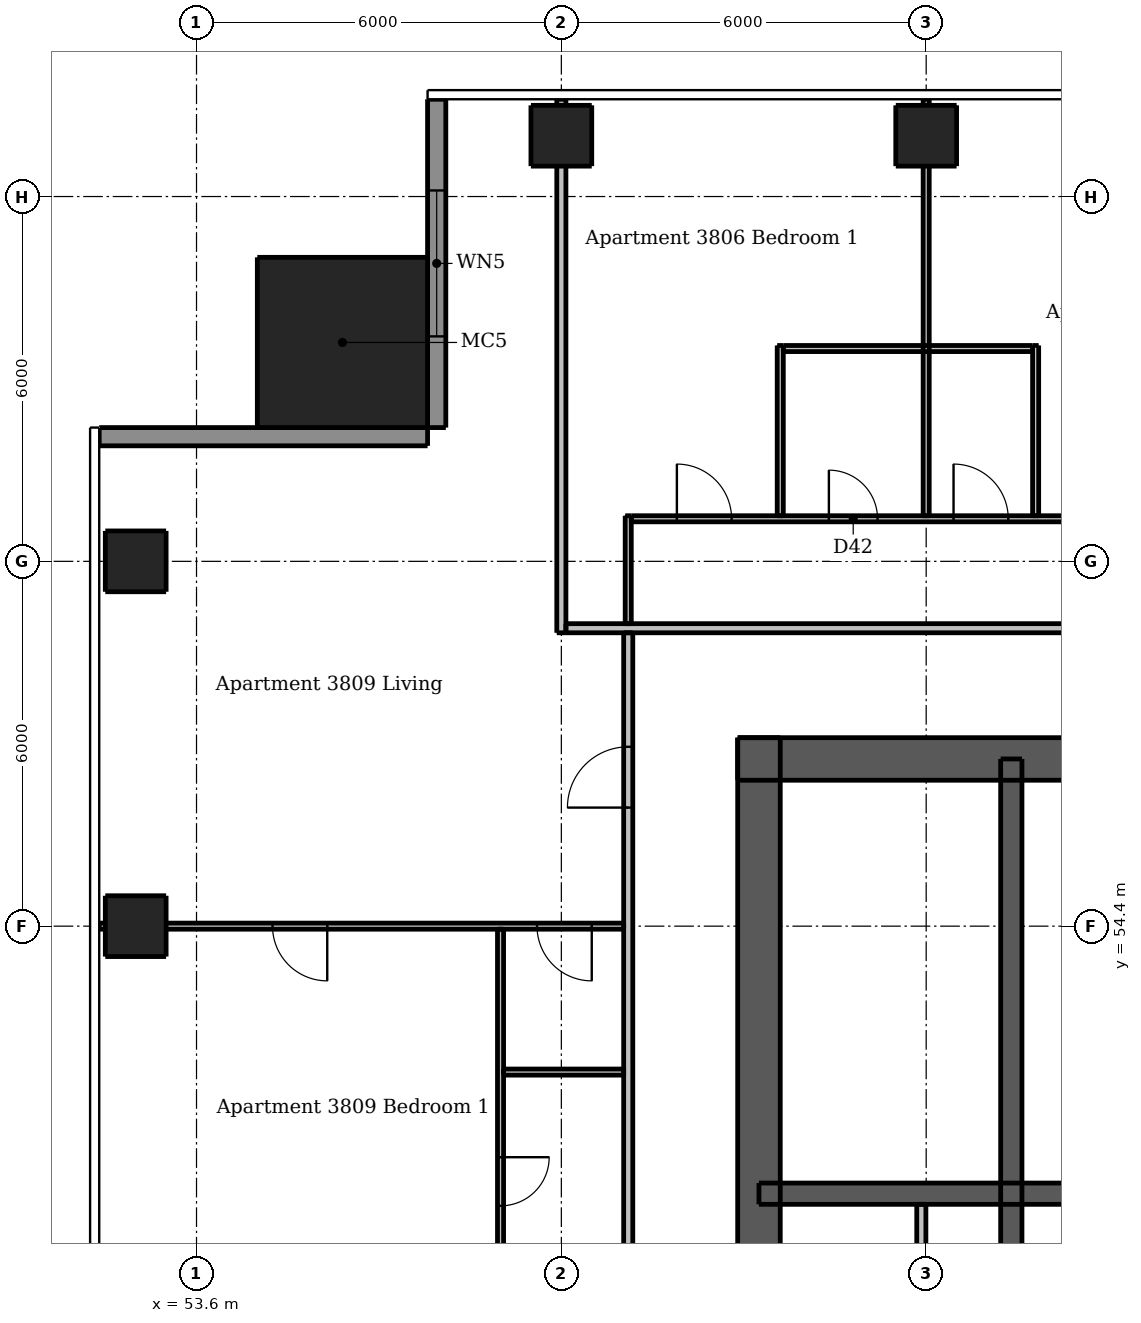
"""IFC4 building model, lengths in metres.
Left out: names, types, materials, properties, quantities, classifications, styles, units other than length and angle.
Written with IfcOpenShell. Run it as: python <this file> out.ifc"""

import sys

from ifc_helpers import new_model, si_unit, direction, frame, frame_2d, origin, origin_2d, place, context, subcontext, project, spatial, rectangle, extrude, element, fill, save


model = new_model("IFC4")
c1 = context("Model", 3, precision=1e-05, world=origin(), true_north=direction((0.0, 1.0)))
c2 = subcontext(c1, "Body", "Model", "MODEL_VIEW")
j1 = project(units=[si_unit("LENGTHUNIT", "METRE"), si_unit("PLANEANGLEUNIT", "RADIAN")], contexts=[c1])
p1 = place(None, origin())
s1 = spatial("IfcSite", under=j1, at=p1, CompositionType="ELEMENT")
p2 = place(p1, origin())
s2 = spatial("IfcBuilding", under=s1, at=p2, CompositionType="ELEMENT")
p3 = place(p2, frame((0.0, 0.0, 143.8)))
s3 = spatial("IfcBuildingStorey", under=s2, at=p3, CompositionType="ELEMENT", Elevation=143.8)
p4 = place(p3, frame((62.5, 57.15, 0.0), z_axis=(0.0, 0.0, 1.0), x_axis=(1.0, 0.0, 0.0)))
e1 = element("IfcWall", 1, at=p4, inside=s3, PredefinedType="SHEAR", context=c2, shape_type="SweptSolid", body=[
    extrude(rectangle(XDim=24.0, YDim=0.7, at=frame_2d((12.0, 0.0))), origin(), (0.0, 0.0, 1.0), 3.05),
])
p5 = place(p4, frame((20.938, 0.0, 0.0)))
e2 = element("IfcOpeningElement", 2, at=p5, cuts=e1, PredefinedType="OPENING", context=c2, shape_type="SweptSolid", body=[
    extrude(rectangle(XDim=1.1, YDim=2.1, at=frame_2d((0.55, 1.05))), frame((0.0, 0.36, 0.0), z_axis=(0.0, -1.0, 0.0), x_axis=(1.0, 0.0, 0.0)), (0.0, 0.0, 1.0), 0.72),
])
p6 = place(p4, frame((1.962, 0.0, 0.0)))
e3 = element("IfcOpeningElement", 3, at=p6, cuts=e1, PredefinedType="OPENING", context=c2, shape_type="SweptSolid", body=[
    extrude(rectangle(XDim=1.1, YDim=2.1, at=frame_2d((0.55, 1.05))), frame((0.0, 0.36, 0.0), z_axis=(0.0, -1.0, 0.0), x_axis=(1.0, 0.0, 0.0)), (0.0, 0.0, 1.0), 0.72),
])
p7 = place(p4, frame((7.887, 0.0, 0.0)))
e4 = element("IfcOpeningElement", 4, at=p7, cuts=e1, PredefinedType="OPENING", context=c2, shape_type="SweptSolid", body=[
    extrude(rectangle(XDim=0.9, YDim=2.1, at=frame_2d((0.45, 1.05))), frame((0.0, 0.36, 0.0), z_axis=(0.0, -1.0, 0.0), x_axis=(1.0, 0.0, 0.0)), (0.0, 0.0, 1.0), 0.72),
])
p8 = place(p4, frame((15.212, 0.0, 0.0)))
e5 = element("IfcOpeningElement", 5, at=p8, cuts=e1, PredefinedType="OPENING", context=c2, shape_type="SweptSolid", body=[
    extrude(rectangle(XDim=0.9, YDim=2.1, at=frame_2d((0.45, 1.05))), frame((0.0, 0.36, 0.0), z_axis=(0.0, -1.0, 0.0), x_axis=(1.0, 0.0, 0.0)), (0.0, 0.0, 1.0), 0.72),
])
p9 = place(p3, frame((62.85, 33.5, 0.0), z_axis=(0.0, 0.0, 1.0), x_axis=(0.0, 1.0, 0.0)))
e6 = element("IfcWall", 6, at=p9, inside=s3, PredefinedType="SHEAR", context=c2, shape_type="SweptSolid", body=[
    extrude(rectangle(XDim=24.0, YDim=0.7, at=frame_2d((12.0, 0.0))), origin(), (0.0, 0.0, 1.0), 3.05),
])
p10 = place(p9, frame((11.2, 0.0, 0.0)))
e7 = element("IfcOpeningElement", 7, at=p10, cuts=e6, PredefinedType="OPENING", context=c2, shape_type="SweptSolid", body=[
    extrude(rectangle(XDim=1.6, YDim=2.1, at=frame_2d((0.8, 1.05))), frame((0.0, 0.36, 0.0), z_axis=(0.0, -1.0, 0.0), x_axis=(1.0, 0.0, 0.0)), (0.0, 0.0, 1.0), 0.72),
])
p11 = place(p3, frame((62.85, 50.0, 0.0), z_axis=(0.0, 0.0, 1.0), x_axis=(1.0, 0.0, 0.0)))
e8 = element("IfcWall", 8, at=p11, inside=s3, PredefinedType="SHEAR", context=c2, shape_type="SweptSolid", body=[
    extrude(rectangle(XDim=23.3, YDim=0.35, at=frame_2d((11.65, 0.0))), origin(), (0.0, 0.0, 1.0), 3.05),
])
p12 = place(p3, frame((67.0, 47.1, 0.0), z_axis=(0.0, 0.0, 1.0), x_axis=(0.0, 1.0, 0.0)))
e9 = element("IfcWall", 9, at=p12, inside=s3, PredefinedType="SHEAR", context=c2, shape_type="SweptSolid", body=[
    extrude(rectangle(XDim=10.05, YDim=0.35, at=frame_2d((5.025, 0.0))), origin(), (0.0, 0.0, 1.0), 3.05),
])
for number, where, z_axis, x_axis in (
    (10, (59.6, 67.4, 0.0), (0.0, 0.0, 1.0), (1.0, 0.0, 0.0)),
    (11, (65.6, 67.4, 0.0), (0.0, 0.0, 1.0), (1.0, 0.0, 0.0)),
    (12, (52.6, 54.4, 0.0), (0.0, 0.0, 1.0), (1.0, 0.0, 0.0)),
    (13, (52.6, 60.4, 0.0), (0.0, 0.0, 1.0), (1.0, 0.0, 0.0)),
):
    element("IfcColumn", number, at=place(p3, frame(where, z_axis=z_axis, x_axis=x_axis)), inside=s3, PredefinedType="COLUMN", context=c2, shape_type="SweptSolid", body=[
        extrude(rectangle(XDim=1.0, YDim=1.0, at=origin_2d()), origin(), (0.0, 0.0, 1.0), 3.05),
    ])
p13 = place(p3, frame((56.0, 64.0, 0.0), z_axis=(0.0, 0.0, 1.0), x_axis=(1.0, 0.0, 0.0)))
e14 = element("IfcColumn", 14, at=p13, inside=s3, PredefinedType="COLUMN", context=c2, shape_type="SweptSolid", body=[
    extrude(rectangle(XDim=2.8, YDim=2.8, at=origin_2d()), origin(), (0.0, 0.0, 1.0), 3.3),
])
p14 = place(p3, frame((57.55, 68.0, 0.0), z_axis=(0.0, 0.0, 1.0), x_axis=(0.0, -1.0, 0.0)))
e15 = element("IfcWall", 15, at=p14, inside=s3, PredefinedType="SOLIDWALL", context=c2, shape_type="SweptSolid", body=[
    extrude(rectangle(XDim=5.4, YDim=0.3, at=frame_2d((2.7, 0.0))), origin(), (0.0, 0.0, 1.0), 3.05),
])
p15 = place(p14, frame((1.5, 0.0, 0.15)))
e16 = element("IfcOpeningElement", 16, at=p15, cuts=e15, PredefinedType="OPENING", context=c2, shape_type="SweptSolid", body=[
    extrude(rectangle(XDim=2.4, YDim=2.1, at=frame_2d((1.2, 1.05))), frame((0.0, 0.16, 0.0), z_axis=(0.0, -1.0, 0.0), x_axis=(1.0, 0.0, 0.0)), (0.0, 0.0, 1.0), 0.32),
])
p16 = place(p3, frame((57.4, 62.45, 0.0), z_axis=(0.0, 0.0, 1.0), x_axis=(-1.0, 0.0, 0.0)))
e17 = element("IfcWall", 17, at=p16, inside=s3, PredefinedType="SOLIDWALL", context=c2, shape_type="SweptSolid", body=[
    extrude(rectangle(XDim=5.4, YDim=0.3, at=frame_2d((2.7, 0.0))), origin(), (0.0, 0.0, 1.0), 3.05),
])
p17 = place(p3, frame((65.52, 47.275, 0.0), z_axis=(0.0, 0.0, 1.0), x_axis=(0.0, 1.0, 0.0)))
e18 = element("IfcWall", 18, at=p17, inside=s3, PredefinedType="PLUMBINGWALL", context=c2, shape_type="SweptSolid", body=[
    extrude(rectangle(XDim=2.55, YDim=0.15, at=frame_2d((1.275, 0.0))), origin(), (0.0, 0.0, 1.0), 3.05),
])
p18 = place(p3, frame((58.6, 54.35, 0.0), z_axis=(0.0, 0.0, 1.0), x_axis=(0.0, -1.0, 0.0)))
e19 = element("IfcWall", 19, at=p18, inside=s3, PredefinedType="PARTITIONING", context=c2, shape_type="SweptSolid", body=[
    extrude(rectangle(XDim=5.875, YDim=0.1, at=frame_2d((2.938, 0.0))), origin(), (0.0, 0.0, 1.0), 3.05),
])
p19 = place(p18, frame((3.75, 0.0, 0.0)))
e20 = element("IfcOpeningElement", 20, at=p19, cuts=e19, PredefinedType="OPENING", context=c2, shape_type="SweptSolid", body=[
    extrude(rectangle(XDim=0.8, YDim=2.1, at=frame_2d((0.4, 1.05))), frame((0.0, 0.06, 0.0), z_axis=(0.0, -1.0, 0.0), x_axis=(1.0, 0.0, 0.0)), (0.0, 0.0, 1.0), 0.12),
])
p20 = place(p3, frame((60.7, 59.375, 0.0), z_axis=(0.0, 0.0, 1.0), x_axis=(0.0, 1.0, 0.0)))
e21 = element("IfcWall", 21, at=p20, inside=s3, PredefinedType="PARTITIONING", context=c2, shape_type="SweptSolid", body=[
    extrude(rectangle(XDim=1.775, YDim=0.1, at=frame_2d((0.887, 0.0))), origin(), (0.0, 0.0, 1.0), 3.05),
])
p21 = place(p3, frame((63.2, 61.15, 0.0), z_axis=(0.0, 0.0, 1.0), x_axis=(0.0, 1.0, 0.0)))
e22 = element("IfcWall", 22, at=p21, inside=s3, PredefinedType="PARTITIONING", context=c2, shape_type="SweptSolid", body=[
    extrude(rectangle(XDim=2.8, YDim=0.1, at=frame_2d((1.4, 0.0))), origin(), (0.0, 0.0, 1.0), 3.05),
])
p22 = place(p3, frame((65.6, 61.15, 0.0), z_axis=(0.0, 0.0, 1.0), x_axis=(0.0, 1.0, 0.0)))
e23 = element("IfcWall", 23, at=p22, inside=s3, PredefinedType="PARTITIONING", context=c2, shape_type="SweptSolid", body=[
    extrude(rectangle(XDim=6.85, YDim=0.1, at=frame_2d((3.425, 0.0))), origin(), (0.0, 0.0, 1.0), 2.516),
])
p23 = place(p3, frame((67.4, 61.15, 0.0), z_axis=(0.0, 0.0, 1.0), x_axis=(0.0, 1.0, 0.0)))
e24 = element("IfcWall", 24, at=p23, inside=s3, PredefinedType="PARTITIONING", context=c2, shape_type="SweptSolid", body=[
    extrude(rectangle(XDim=2.8, YDim=0.1, at=frame_2d((1.4, 0.0))), origin(), (0.0, 0.0, 1.0), 3.05),
])
p24 = place(p3, frame((63.25, 63.9, 0.0), z_axis=(0.0, 0.0, 1.0), x_axis=(1.0, 0.0, 0.0)))
e25 = element("IfcWall", 25, at=p24, inside=s3, PredefinedType="PARTITIONING", context=c2, shape_type="SweptSolid", body=[
    extrude(rectangle(XDim=4.1, YDim=0.1, at=frame_2d((2.05, 0.0))), origin(), (0.0, 0.0, 1.0), 3.05),
])
p25 = place(p3, frame((60.75, 61.1, 0.0), z_axis=(0.0, 0.0, 1.0), x_axis=(1.0, 0.0, 0.0)))
e26 = element("IfcWall", 26, at=p25, inside=s3, PredefinedType="PARTITIONING", context=c2, shape_type="SweptSolid", body=[
    extrude(rectangle(XDim=16.775, YDim=0.1, at=frame_2d((8.387, 0.0))), origin(), (0.0, 0.0, 1.0), 3.05),
])
p26 = place(p25, frame((9.8, 0.0, 0.0)))
e27 = element("IfcOpeningElement", 27, at=p26, cuts=e26, PredefinedType="OPENING", context=c2, shape_type="SweptSolid", body=[
    extrude(rectangle(XDim=0.9, YDim=2.1, at=frame_2d((0.45, 1.05))), frame((0.0, 0.06, 0.0), z_axis=(0.0, -1.0, 0.0), x_axis=(1.0, 0.0, 0.0)), (0.0, 0.0, 1.0), 0.12),
])
p27 = place(p25, frame((14.9, 0.0, 0.0)))
e28 = element("IfcOpeningElement", 28, at=p27, cuts=e26, PredefinedType="OPENING", context=c2, shape_type="SweptSolid", body=[
    extrude(rectangle(XDim=0.9, YDim=2.1, at=frame_2d((0.45, 1.05))), frame((0.0, 0.06, 0.0), z_axis=(0.0, -1.0, 0.0), x_axis=(1.0, 0.0, 0.0)), (0.0, 0.0, 1.0), 0.12),
])
p28 = place(p25, frame((5.3, 0.0, 0.0)))
e29 = element("IfcOpeningElement", 29, at=p28, cuts=e26, PredefinedType="OPENING", context=c2, shape_type="SweptSolid", body=[
    extrude(rectangle(XDim=0.9, YDim=2.1, at=frame_2d((0.45, 1.05))), frame((0.0, 0.06, 0.0), z_axis=(0.0, -1.0, 0.0), x_axis=(1.0, 0.0, 0.0)), (0.0, 0.0, 1.0), 0.12),
])
p29 = place(p25, frame((0.75, 0.0, 0.0)))
e30 = element("IfcOpeningElement", 30, at=p29, cuts=e26, PredefinedType="OPENING", context=c2, shape_type="SweptSolid", body=[
    extrude(rectangle(XDim=0.9, YDim=2.1, at=frame_2d((0.45, 1.05))), frame((0.0, 0.06, 0.0), z_axis=(0.0, -1.0, 0.0), x_axis=(1.0, 0.0, 0.0)), (0.0, 0.0, 1.0), 0.12),
])
p30 = place(p25, frame((3.25, 0.0, 0.0)))
e31 = element("IfcOpeningElement", 31, at=p30, cuts=e26, PredefinedType="OPENING", context=c2, shape_type="SweptSolid", body=[
    extrude(rectangle(XDim=0.8, YDim=2.1, at=frame_2d((0.4, 1.05))), frame((0.0, 0.06, 0.0), z_axis=(0.0, -1.0, 0.0), x_axis=(1.0, 0.0, 0.0)), (0.0, 0.0, 1.0), 0.12),
])
p31 = place(p3, frame((60.625, 54.4, 0.0), z_axis=(0.0, 0.0, 1.0), x_axis=(-1.0, 0.0, 0.0)))
e32 = element("IfcWall", 32, at=p31, inside=s3, PredefinedType="PARTITIONING", context=c2, shape_type="SweptSolid", body=[
    extrude(rectangle(XDim=8.625, YDim=0.1, at=frame_2d((4.312, 0.0))), origin(), (0.0, 0.0, 1.0), 2.516),
])
p32 = place(p31, frame((0.525, 0.0, 0.0)))
e33 = element("IfcOpeningElement", 33, at=p32, cuts=e32, PredefinedType="OPENING", context=c2, shape_type="SweptSolid", body=[
    extrude(rectangle(XDim=0.9, YDim=2.1, at=frame_2d((0.45, 1.05))), frame((0.0, 0.06, 0.0), z_axis=(0.0, -1.0, 0.0), x_axis=(1.0, 0.0, 0.0)), (0.0, 0.0, 1.0), 0.12),
])
p33 = place(p31, frame((4.875, 0.0, 0.0)))
e34 = element("IfcOpeningElement", 34, at=p33, cuts=e32, PredefinedType="OPENING", context=c2, shape_type="SweptSolid", body=[
    extrude(rectangle(XDim=0.9, YDim=2.1, at=frame_2d((0.45, 1.05))), frame((0.0, 0.06, 0.0), z_axis=(0.0, -1.0, 0.0), x_axis=(1.0, 0.0, 0.0)), (0.0, 0.0, 1.0), 0.12),
])
p34 = place(p3, frame((58.65, 52.0, 0.0), z_axis=(0.0, 0.0, 1.0), x_axis=(1.0, 0.0, 0.0)))
e35 = element("IfcWall", 35, at=p34, inside=s3, PredefinedType="PARTITIONING", context=c2, shape_type="SweptSolid", body=[
    extrude(rectangle(XDim=1.975, YDim=0.1, at=frame_2d((0.988, 0.0))), origin(), (0.0, 0.0, 1.0), 3.05),
])
p35 = place(p3, frame((59.6, 59.225, 0.0), z_axis=(0.0, 0.0, 1.0), x_axis=(0.0, 1.0, 0.0)))
e36 = element("IfcWall", 36, at=p35, inside=s3, PredefinedType="PARTITIONING", context=c2, shape_type="SweptSolid", body=[
    extrude(rectangle(XDim=8.775, YDim=0.15, at=frame_2d((4.387, 0.0))), origin(), (0.0, 0.0, 1.0), 2.51),
])
p36 = place(p3, frame((60.7, 30.325, 0.0), z_axis=(0.0, 0.0, 1.0), x_axis=(0.0, 1.0, 0.0)))
e37 = element("IfcWall", 37, at=p36, inside=s3, PredefinedType="PARTITIONING", context=c2, shape_type="SweptSolid", body=[
    extrude(rectangle(XDim=28.9, YDim=0.15, at=frame_2d((14.45, 0.0))), origin(), (0.0, 0.0, 1.0), 3.05),
])
p37 = place(p36, frame((9.225, 0.0, 0.0)))
e38 = element("IfcOpeningElement", 38, at=p37, cuts=e37, PredefinedType="OPENING", context=c2, shape_type="SweptSolid", body=[
    extrude(rectangle(XDim=1.0, YDim=2.1, at=frame_2d((0.5, 1.05))), frame((0.0, 0.085, 0.0), z_axis=(0.0, -1.0, 0.0), x_axis=(1.0, 0.0, 0.0)), (0.0, 0.0, 1.0), 0.17),
])
p38 = place(p36, frame((26.025, 0.0, 0.0)))
e39 = element("IfcOpeningElement", 39, at=p38, cuts=e37, PredefinedType="OPENING", context=c2, shape_type="SweptSolid", body=[
    extrude(rectangle(XDim=1.0, YDim=2.1, at=frame_2d((0.5, 1.05))), frame((0.0, 0.085, 0.0), z_axis=(0.0, -1.0, 0.0), x_axis=(1.0, 0.0, 0.0)), (0.0, 0.0, 1.0), 0.17),
])
p39 = place(p3, frame((59.675, 59.3, 0.0), z_axis=(0.0, 0.0, 1.0), x_axis=(1.0, 0.0, 0.0)))
e40 = element("IfcWall", 40, at=p39, inside=s3, PredefinedType="PARTITIONING", context=c2, shape_type="SweptSolid", body=[
    extrude(rectangle(XDim=28.55, YDim=0.15, at=frame_2d((14.275, 0.0))), origin(), (0.0, 0.0, 1.0), 3.05),
])
p40 = place(p39, frame((8.975, 0.0, 0.0)))
e41 = element("IfcOpeningElement", 41, at=p40, cuts=e40, PredefinedType="OPENING", context=c2, shape_type="SweptSolid", body=[
    extrude(rectangle(XDim=1.0, YDim=2.1, at=frame_2d((0.5, 1.05))), frame((0.0, 0.085, 0.0), z_axis=(0.0, -1.0, 0.0), x_axis=(1.0, 0.0, 0.0)), (0.0, 0.0, 1.0), 0.17),
])
p41 = place(p39, frame((25.775, 0.0, 0.0)))
e42 = element("IfcOpeningElement", 42, at=p41, cuts=e40, PredefinedType="OPENING", context=c2, shape_type="SweptSolid", body=[
    extrude(rectangle(XDim=1.0, YDim=2.1, at=frame_2d((0.5, 1.05))), frame((0.0, 0.085, 0.0), z_axis=(0.0, -1.0, 0.0), x_axis=(1.0, 0.0, 0.0)), (0.0, 0.0, 1.0), 0.17),
])
p42 = place(p15, origin())
e43 = element("IfcWindow", 43, at=p42, inside=s3, PartitioningType="DOUBLE_PANEL_VERTICAL", PredefinedType="WINDOW", context=c2, shape_type="SweptSolid", body=[
    extrude(rectangle(XDim=2.4, YDim=2.1, at=frame_2d((1.2, 1.05))), frame((0.0, 0.03, 0.0), z_axis=(0.0, -1.0, 0.0), x_axis=(1.0, 0.0, 0.0)), (0.0, 0.0, 1.0), 0.06),
])
fill(e16, e43)
p43 = place(p6, origin())
e44 = element("IfcDoor", 44, at=p43, inside=s3, OperationType="SINGLE_SWING_LEFT", PredefinedType="DOOR", context=c2, shape_type="SweptSolid", body=[
    extrude(rectangle(XDim=1.1, YDim=2.1, at=frame_2d((0.55, 1.05))), frame((0.0, -0.288, 0.0), z_axis=(0.0, -1.0, 0.0), x_axis=(1.0, 0.0, 0.0)), (0.0, 0.0, 1.0), 0.05),
])
fill(e3, e44)
p44 = place(p28, origin())
e45 = element("IfcDoor", 45, at=p44, inside=s3, OperationType="SINGLE_SWING_LEFT", PredefinedType="DOOR", context=c2, shape_type="SweptSolid", body=[
    extrude(rectangle(XDim=0.9, YDim=2.1, at=frame_2d((0.45, 1.05))), frame((0.0, 0.025, 0.0), z_axis=(0.0, -1.0, 0.0), x_axis=(1.0, 0.0, 0.0)), (0.0, 0.0, 1.0), 0.05),
])
fill(e29, e45)
p45 = place(p29, origin())
e46 = element("IfcDoor", 46, at=p45, inside=s3, OperationType="SINGLE_SWING_LEFT", PredefinedType="DOOR", context=c2, shape_type="SweptSolid", body=[
    extrude(rectangle(XDim=0.9, YDim=2.1, at=frame_2d((0.45, 1.05))), frame((0.0, 0.025, 0.0), z_axis=(0.0, -1.0, 0.0), x_axis=(1.0, 0.0, 0.0)), (0.0, 0.0, 1.0), 0.05),
])
fill(e30, e46)
p46 = place(p30, origin())
e47 = element("IfcDoor", 47, at=p46, inside=s3, OperationType="SINGLE_SWING_LEFT", PredefinedType="DOOR", context=c2, shape_type="SweptSolid", body=[
    extrude(rectangle(XDim=0.8, YDim=2.1, at=frame_2d((0.4, 1.05))), frame((0.0, 0.025, 0.0), z_axis=(0.0, -1.0, 0.0), x_axis=(1.0, 0.0, 0.0)), (0.0, 0.0, 1.0), 0.05),
])
fill(e31, e47)
p47 = place(p38, origin())
e48 = element("IfcDoor", 48, at=p47, inside=s3, OperationType="SINGLE_SWING_LEFT", PredefinedType="DOOR", context=c2, shape_type="SweptSolid", body=[
    extrude(rectangle(XDim=1.0, YDim=2.1, at=frame_2d((0.5, 1.05))), frame((0.0, 0.025, 0.0), z_axis=(0.0, -1.0, 0.0), x_axis=(1.0, 0.0, 0.0)), (0.0, 0.0, 1.0), 0.05),
])
fill(e39, e48)
p48 = place(p32, origin())
e49 = element("IfcDoor", 49, at=p48, inside=s3, OperationType="SINGLE_SWING_LEFT", PredefinedType="DOOR", context=c2, shape_type="SweptSolid", body=[
    extrude(rectangle(XDim=0.9, YDim=2.1, at=frame_2d((0.45, 1.05))), frame((0.0, 0.025, 0.0), z_axis=(0.0, -1.0, 0.0), x_axis=(1.0, 0.0, 0.0)), (0.0, 0.0, 1.0), 0.05),
])
fill(e33, e49)
p49 = place(p33, origin())
e50 = element("IfcDoor", 50, at=p49, inside=s3, OperationType="SINGLE_SWING_LEFT", PredefinedType="DOOR", context=c2, shape_type="SweptSolid", body=[
    extrude(rectangle(XDim=0.9, YDim=2.1, at=frame_2d((0.45, 1.05))), frame((0.0, 0.025, 0.0), z_axis=(0.0, -1.0, 0.0), x_axis=(1.0, 0.0, 0.0)), (0.0, 0.0, 1.0), 0.05),
])
fill(e34, e50)
p50 = place(p19, origin())
e51 = element("IfcDoor", 51, at=p50, inside=s3, OperationType="SINGLE_SWING_LEFT", PredefinedType="DOOR", context=c2, shape_type="SweptSolid", body=[
    extrude(rectangle(XDim=0.8, YDim=2.1, at=frame_2d((0.4, 1.05))), frame((0.0, 0.025, 0.0), z_axis=(0.0, -1.0, 0.0), x_axis=(1.0, 0.0, 0.0)), (0.0, 0.0, 1.0), 0.05),
])
fill(e20, e51)
save(model, sys.argv[1])
